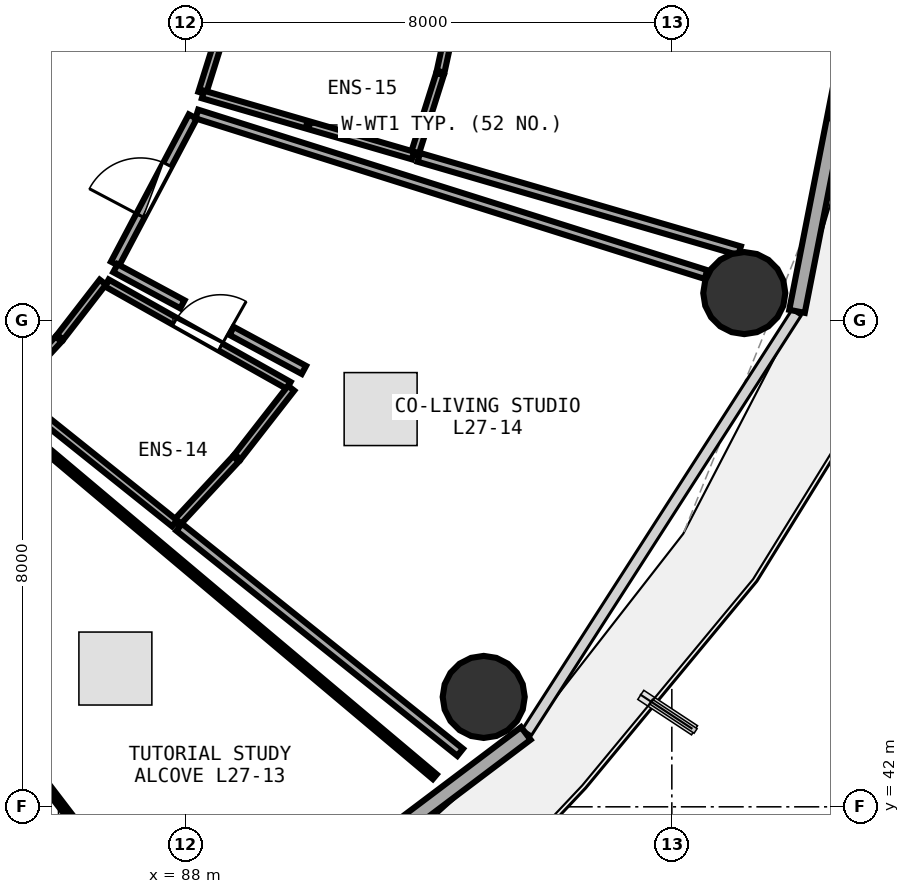
"""IFC4 building model, lengths in metres.
Left out: names, types, materials, properties, quantities, classifications, styles, units other than length and angle.
Written with IfcOpenShell. Run it as: python <this file> out.ifc"""

import sys

from ifc_helpers import new_model, si_unit, direction, frame, frame_2d, origin, origin_2d, place, context, subcontext, project, spatial, rectangle, circle, extrude, element, fill, save


model = new_model("IFC4")
c1 = context("Model", 3, precision=1e-05, world=origin(), true_north=direction((0.0, 1.0)))
c2 = subcontext(c1, "Body", "Model", "MODEL_VIEW")
j1 = project(units=[si_unit("LENGTHUNIT", "METRE"), si_unit("PLANEANGLEUNIT", "RADIAN")], contexts=[c1])
p1 = place(None, origin())
s1 = spatial("IfcSite", under=j1, at=p1, CompositionType="ELEMENT")
p2 = place(p1, origin())
s2 = spatial("IfcBuilding", under=s1, at=p2, CompositionType="ELEMENT")
p3 = place(p2, frame((0.0, 0.0, 106.35)))
s3 = spatial("IfcBuildingStorey", under=s2, at=p3, CompositionType="ELEMENT", Elevation=106.35)
for number, where, z_axis, x_axis in (
    (1, (92.906, 43.807, 0.0), (0.0, 0.0, 1.0), (1.0, 0.0, 0.0)),
    (2, (97.192, 50.448, 0.0), (0.0, 0.0, 1.0), (1.0, 0.0, 0.0)),
):
    element("IfcColumn", number, at=place(p3, frame(where, z_axis=z_axis, x_axis=x_axis)), inside=s3, PredefinedType="COLUMN", context=c2, shape_type="SweptSolid", body=[
        extrude(circle(Radius=0.675, at=origin_2d()), origin(), (0.0, 0.0, 1.0), 3.75),
    ])
p4 = place(p3, frame((86.812, 38.09, 0.0), z_axis=(0.0, 0.0, 1.0), x_axis=(0.798501507879, 0.601992808857, 0.0)))
e3 = element("IfcWall", 3, at=p4, inside=s3, PredefinedType="SOLIDWALL", context=c2, shape_type="SweptSolid", body=[
    extrude(rectangle(XDim=8.499, YDim=0.26, at=frame_2d((4.25, 0.0))), origin(), (0.0, 0.0, 1.0), 3.475),
])
p5 = place(p4, frame((3.45, 0.0, 0.85)))
e4 = element("IfcOpeningElement", 4, at=p5, cuts=e3, PredefinedType="OPENING", context=c2, shape_type="SweptSolid", body=[
    extrude(rectangle(XDim=1.6, YDim=1.45, at=frame_2d((0.8, 0.725))), frame((0.0, 0.14, 0.0), z_axis=(0.0, -1.0, 0.0), x_axis=(1.0, 0.0, 0.0)), (0.0, 0.0, 1.0), 0.28),
])
p6 = place(p3, frame((98.059, 50.148, 0.0), z_axis=(0.0, 0.0, 1.0), x_axis=(0.192581843632, 0.981280914674, 0.0)))
e5 = element("IfcWall", 5, at=p6, inside=s3, PredefinedType="SOLIDWALL", context=c2, shape_type="SweptSolid", body=[
    extrude(rectangle(XDim=7.987, YDim=0.26, at=frame_2d((3.993, 0.0))), origin(), (0.0, 0.0, 1.0), 3.475),
])
p7 = place(p6, frame((3.193, 0.0, 0.85)))
e6 = element("IfcOpeningElement", 6, at=p7, cuts=e5, PredefinedType="OPENING", context=c2, shape_type="SweptSolid", body=[
    extrude(rectangle(XDim=1.6, YDim=1.45, at=frame_2d((0.8, 0.725))), frame((0.0, 0.14, 0.0), z_axis=(0.0, -1.0, 0.0), x_axis=(1.0, 0.0, 0.0)), (0.0, 0.0, 1.0), 0.28),
])
p8 = place(p3, frame((86.706, 50.615, 0.0), z_axis=(0.0, 0.0, 1.0), x_axis=(0.871227933134, -0.490878690236, 0.0)))
e7 = element("IfcWall", 7, at=p8, inside=s3, PredefinedType="PLUMBINGWALL", context=c2, shape_type="SweptSolid", body=[
    extrude(rectangle(XDim=3.435, YDim=0.13, at=frame_2d((1.717, 0.0))), origin(), (0.0, 0.0, 1.0), 3.235),
])
p9 = place(p8, frame((1.287, 0.0, 0.0)))
e8 = element("IfcOpeningElement", 8, at=p9, cuts=e7, PredefinedType="OPENING", context=c2, shape_type="SweptSolid", body=[
    extrude(rectangle(XDim=0.86, YDim=2.05, at=frame_2d((0.43, 1.025))), frame((0.0, 0.075, 0.0), z_axis=(0.0, -1.0, 0.0), x_axis=(1.0, 0.0, 0.0)), (0.0, 0.0, 1.0), 0.15),
])
p10 = place(p3, frame((86.842, 50.93, 0.0), z_axis=(0.0, 0.0, 1.0), x_axis=(0.467240653506, 0.884130178034, 0.0)))
e9 = element("IfcWall", 9, at=p10, inside=s3, PredefinedType="PARTITIONING", context=c2, shape_type="SweptSolid", body=[
    extrude(rectangle(XDim=2.74, YDim=0.15, at=frame_2d((1.37, 0.0))), origin(), (0.0, 0.0, 1.0), 2.925),
])
p11 = place(p10, frame((0.895, 0.0, 0.0)))
e10 = element("IfcOpeningElement", 10, at=p11, cuts=e9, PredefinedType="OPENING", context=c2, shape_type="SweptSolid", body=[
    extrude(rectangle(XDim=0.95, YDim=2.08, at=frame_2d((0.475, 1.04))), frame((0.0, 0.085, 0.0), z_axis=(0.0, -1.0, 0.0), x_axis=(1.0, 0.0, 0.0)), (0.0, 0.0, 1.0), 0.17),
])
p12 = place(p3, frame((84.896, 48.557, 0.0), z_axis=(0.0, 0.0, 1.0), x_axis=(0.765171343651, -0.64382669629, 0.0)))
e11 = element("IfcWall", 11, at=p12, inside=s3, PredefinedType="PARTITIONING", context=c2, shape_type="SweptSolid", body=[
    extrude(rectangle(XDim=9.416, YDim=0.1, at=frame_2d((4.708, 0.0))), origin(), (0.0, 0.0, 1.0), 2.975),
])
p13 = place(p3, frame((87.98, 39.383, 0.0), z_axis=(0.0, 0.0, 1.0), x_axis=(-0.607281003039, 0.794487119687, 0.0)))
e12 = element("IfcWall", 12, at=p13, inside=s3, PredefinedType="PARTITIONING", context=c2, shape_type="SweptSolid", body=[
    extrude(rectangle(XDim=6.806, YDim=0.1, at=frame_2d((3.403, 0.0))), origin(), (0.0, 0.0, 1.0), 2.925),
])
p14 = place(p3, frame((85.131, 48.842, 0.0), z_axis=(0.0, 0.0, 1.0), x_axis=(0.677595961293, 0.73543437045, 0.0)))
e13 = element("IfcWall", 13, at=p14, inside=s3, PredefinedType="PLUMBINGWALL", context=c2, shape_type="SweptSolid", body=[
    extrude(rectangle(XDim=1.156, YDim=0.13, at=frame_2d((0.578, 0.0))), origin(), (0.0, 0.0, 1.0), 2.925),
])
p15 = place(p3, frame((85.94, 49.723, 0.0), z_axis=(0.0, 0.0, 1.0), x_axis=(0.61219897041, 0.790703750231, 0.0)))
e14 = element("IfcWall", 14, at=p15, inside=s3, PredefinedType="PLUMBINGWALL", context=c2, shape_type="SweptSolid", body=[
    extrude(rectangle(XDim=1.146, YDim=0.13, at=frame_2d((0.573, 0.0))), origin(), (0.0, 0.0, 1.0), 3.48),
])
p16 = place(p3, frame((89.739, 48.884, 0.0), z_axis=(0.0, 0.0, 1.0), x_axis=(-0.614790089133, -0.788690779903, 0.0)))
e15 = element("IfcWall", 15, at=p16, inside=s3, PredefinedType="PLUMBINGWALL", context=c2, shape_type="SweptSolid", body=[
    extrude(rectangle(XDim=1.432, YDim=0.13, at=frame_2d((0.716, 0.0))), origin(), (0.0, 0.0, 1.0), 3.48),
])
p17 = place(p3, frame((88.833, 47.724, 0.0), z_axis=(0.0, 0.0, 1.0), x_axis=(-0.679724752717, -0.733467286621, 0.0)))
e16 = element("IfcWall", 16, at=p17, inside=s3, PredefinedType="PLUMBINGWALL", context=c2, shape_type="SweptSolid", body=[
    extrude(rectangle(XDim=1.445, YDim=0.13, at=frame_2d((0.722, 0.0))), origin(), (0.0, 0.0, 1.0), 2.925),
])
p18 = place(p3, frame((87.821, 46.663, 0.0), z_axis=(0.0, 0.0, 1.0), x_axis=(-0.780744298962, 0.624850653868, 0.0)))
e17 = element("IfcWall", 17, at=p18, inside=s3, PredefinedType="PLUMBINGWALL", context=c2, shape_type="SweptSolid", body=[
    extrude(rectangle(XDim=3.444, YDim=0.13, at=frame_2d((1.722, 0.0))), origin(), (0.0, 0.0, 1.0), 2.925),
])
p19 = place(p3, frame((88.188, 53.393, 0.0), z_axis=(0.0, 0.0, 1.0), x_axis=(0.95372586497, -0.300677525743, 0.0)))
e18 = element("IfcWall", 18, at=p19, inside=s3, PredefinedType="PARTITIONING", context=c2, shape_type="SweptSolid", body=[
    extrude(rectangle(XDim=8.78, YDim=0.15, at=frame_2d((4.39, 0.0))), origin(), (0.0, 0.0, 1.0), 3.175),
])
p20 = place(p3, frame((92.519, 42.896, 0.0), z_axis=(0.0, 0.0, 1.0), x_axis=(-0.780422060226, 0.625253075093, 0.0)))
e19 = element("IfcWall", 19, at=p20, inside=s3, PredefinedType="PARTITIONING", context=c2, shape_type="SweptSolid", body=[
    extrude(rectangle(XDim=5.921, YDim=0.15, at=frame_2d((2.96, 0.0))), origin(), (0.0, 0.0, 1.0), 2.975),
])
p21 = place(p3, frame((89.949, 49.185, 0.0), z_axis=(0.0, 0.0, 1.0), x_axis=(-0.879994582466, 0.474983720595, 0.0)))
e20 = element("IfcWall", 20, at=p21, inside=s3, PredefinedType="PARTITIONING", context=c2, shape_type="SweptSolid", body=[
    extrude(rectangle(XDim=1.35, YDim=0.15, at=frame_2d((0.675, 0.0))), origin(), (0.0, 0.0, 1.0), 3.175),
])
p22 = place(p3, frame((87.951, 50.263, 0.0), z_axis=(0.0, 0.0, 1.0), x_axis=(-0.880026054437, 0.474925408367, 0.0)))
e21 = element("IfcWall", 21, at=p22, inside=s3, PredefinedType="PARTITIONING", context=c2, shape_type="SweptSolid", body=[
    extrude(rectangle(XDim=1.252, YDim=0.15, at=frame_2d((0.626, 0.0))), origin(), (0.0, 0.0, 1.0), 2.925),
])
p23 = place(p3, frame((88.276, 53.739, 0.0), z_axis=(0.0, 0.0, 1.0), x_axis=(0.299445496357, 0.954113407678, 0.0)))
e22 = element("IfcWall", 22, at=p23, inside=s3, PredefinedType="PLUMBINGWALL", context=c2, shape_type="SweptSolid", body=[
    extrude(rectangle(XDim=1.116, YDim=0.13, at=frame_2d((0.558, 0.0))), origin(), (0.0, 0.0, 1.0), 3.48),
])
p24 = place(p3, frame((92.491, 55.442, 0.0), z_axis=(0.0, 0.0, 1.0), x_axis=(-0.211815062924, -0.977309766204, 0.0)))
e23 = element("IfcWall", 23, at=p24, inside=s3, PredefinedType="PLUMBINGWALL", context=c2, shape_type="SweptSolid", body=[
    extrude(rectangle(XDim=1.385, YDim=0.13, at=frame_2d((0.693, 0.0))), origin(), (0.0, 0.0, 1.0), 3.48),
])
p25 = place(p3, frame((92.187, 54.05, 0.0), z_axis=(0.0, 0.0, 1.0), x_axis=(-0.301333060242, -0.953518949369, 0.0)))
e24 = element("IfcWall", 24, at=p25, inside=s3, PredefinedType="PLUMBINGWALL", context=c2, shape_type="SweptSolid", body=[
    extrude(rectangle(XDim=1.39, YDim=0.13, at=frame_2d((0.695, 0.0))), origin(), (0.0, 0.0, 1.0), 3.48),
])
p26 = place(p3, frame((91.743, 52.711, 0.0), z_axis=(0.0, 0.0, 1.0), x_axis=(-0.960271729766, 0.279066667685, 0.0)))
e25 = element("IfcWall", 25, at=p26, inside=s3, PredefinedType="PLUMBINGWALL", context=c2, shape_type="SweptSolid", body=[
    extrude(rectangle(XDim=3.596, YDim=0.13, at=frame_2d((1.798, 0.0))), origin(), (0.0, 0.0, 1.0), 3.175),
])
p27 = place(p3, frame((97.115, 51.144, 0.0), z_axis=(0.0, 0.0, 1.0), x_axis=(-0.960104911934, 0.279640050924, 0.0)))
e26 = element("IfcWall", 26, at=p27, inside=s3, PredefinedType="PARTITIONING", context=c2, shape_type="SweptSolid", body=[
    extrude(rectangle(XDim=5.496, YDim=0.15, at=frame_2d((2.748, 0.0))), origin(), (0.0, 0.0, 1.0), 2.975),
])
p28 = place(p9, origin())
e27 = element("IfcDoor", 27, at=p28, inside=s3, OperationType="SINGLE_SWING_RIGHT", PredefinedType="DOOR", context=c2, shape_type="SweptSolid", body=[
    extrude(rectangle(XDim=0.86, YDim=2.05, at=frame_2d((0.43, 1.025))), frame((0.0, 0.025, 0.0), z_axis=(0.0, -1.0, 0.0), x_axis=(1.0, 0.0, 0.0)), (0.0, 0.0, 1.0), 0.05),
])
fill(e8, e27)
p29 = place(p11, origin())
e28 = element("IfcDoor", 28, at=p29, inside=s3, OperationType="SINGLE_SWING_LEFT", PredefinedType="DOOR", context=c2, shape_type="SweptSolid", body=[
    extrude(rectangle(XDim=0.95, YDim=2.08, at=frame_2d((0.475, 1.04))), frame((0.0, 0.025, 0.0), z_axis=(0.0, -1.0, 0.0), x_axis=(1.0, 0.0, 0.0)), (0.0, 0.0, 1.0), 0.05),
])
fill(e10, e28)
save(model, sys.argv[1])
